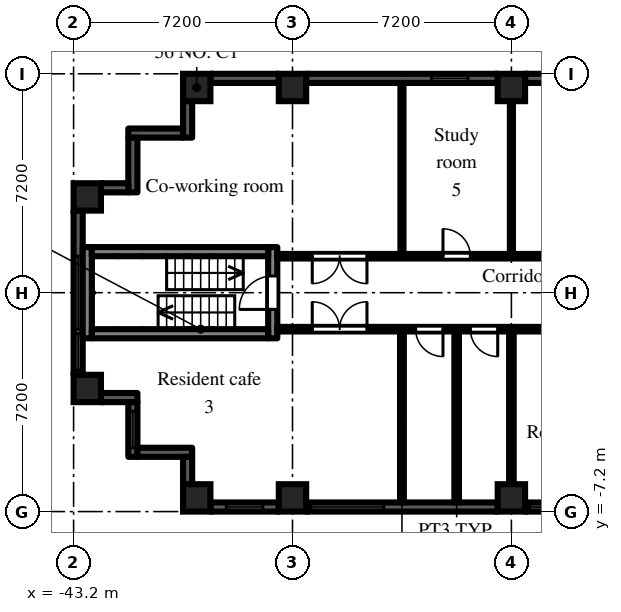
"""IFC4 building model, lengths in metres.
Left out: names, types, materials, properties, quantities, classifications, styles, units other than length and angle.
Written with IfcOpenShell. Run it as: python <this file> out.ifc"""

import sys

from ifc_helpers import new_model, si_unit, direction, frame, frame_2d, origin, origin_2d, place, context, subcontext, project, spatial, rectangle, extrude, element, fill, save


model = new_model("IFC4")
c1 = context("Model", 3, precision=1e-05, world=origin(), true_north=direction((0.0, 1.0)))
c2 = subcontext(c1, "Body", "Model", "MODEL_VIEW")
j1 = project(units=[si_unit("LENGTHUNIT", "METRE"), si_unit("PLANEANGLEUNIT", "RADIAN")], contexts=[c1])
p1 = place(None, origin())
s1 = spatial("IfcSite", under=j1, at=p1, CompositionType="ELEMENT")
p2 = place(p1, origin())
s2 = spatial("IfcBuilding", under=s1, at=p2, CompositionType="ELEMENT")
p3 = place(p2, frame((0.0, 0.0, 35.7)))
s3 = spatial("IfcBuildingStorey", under=s2, at=p3, CompositionType="ELEMENT", Elevation=35.7)
for number, where, z_axis, x_axis in (
    (1, (-42.75, -3.15, 0.0), (0.0, 0.0, 1.0), (1.0, 0.0, 0.0)),
    (2, (-42.75, 3.15, 0.0), (0.0, 0.0, 1.0), (1.0, 0.0, 0.0)),
    (3, (-39.15, -6.75, 0.0), (0.0, 0.0, 1.0), (1.0, 0.0, 0.0)),
    (4, (-39.15, 6.75, 0.0), (0.0, 0.0, 1.0), (1.0, 0.0, 0.0)),
    (5, (-36.0, -6.75, 0.0), (0.0, 0.0, 1.0), (1.0, 0.0, 0.0)),
    (6, (-36.0, 6.75, 0.0), (0.0, 0.0, 1.0), (1.0, 0.0, 0.0)),
    (7, (-28.8, -6.75, 0.0), (0.0, 0.0, 1.0), (1.0, 0.0, 0.0)),
    (8, (-28.8, 6.75, 0.0), (0.0, 0.0, 1.0), (1.0, 0.0, 0.0)),
):
    element("IfcColumn", number, at=place(p3, frame(where, z_axis=z_axis, x_axis=x_axis)), inside=s3, PredefinedType="COLUMN", context=c2, shape_type="SweptSolid", body=[
        extrude(rectangle(XDim=0.9, YDim=0.9, at=origin_2d()), origin(), (0.0, 0.0, 1.0), 3.0),
    ])
p4 = place(p3, frame((-25.2, 7.05, 0.0), z_axis=(0.0, 0.0, 1.0), x_axis=(-1.0, 0.0, 0.0)))
e9 = element("IfcWall", 9, at=p4, inside=s3, PredefinedType="SOLIDWALL", context=c2, shape_type="SweptSolid", body=[
    extrude(rectangle(XDim=3.15, YDim=0.3, at=frame_2d((1.575, 0.0))), origin(), (0.0, 0.0, 1.0), 2.1),
])
p5 = place(p4, frame((0.975, 0.0, 0.2)))
e10 = element("IfcOpeningElement", 10, at=p5, cuts=e9, PredefinedType="OPENING", context=c2, shape_type="SweptSolid", body=[
    extrude(rectangle(XDim=1.2, YDim=1.85, at=frame_2d((0.6, 0.925))), frame((0.0, 0.16, 0.0), z_axis=(0.0, -1.0, 0.0), x_axis=(1.0, 0.0, 0.0)), (0.0, 0.0, 1.0), 0.32),
])
p6 = place(p3, frame((-29.25, 7.05, 0.0), z_axis=(0.0, 0.0, 1.0), x_axis=(-1.0, 0.0, 0.0)))
e11 = element("IfcWall", 11, at=p6, inside=s3, PredefinedType="SOLIDWALL", context=c2, shape_type="SweptSolid", body=[
    extrude(rectangle(XDim=6.3, YDim=0.3, at=frame_2d((3.15, 0.0))), origin(), (0.0, 0.0, 1.0), 2.1),
])
p7 = place(p6, frame((0.975, 0.0, 0.2)))
e12 = element("IfcOpeningElement", 12, at=p7, cuts=e11, PredefinedType="OPENING", context=c2, shape_type="SweptSolid", body=[
    extrude(rectangle(XDim=1.2, YDim=1.85, at=frame_2d((0.6, 0.925))), frame((0.0, 0.16, 0.0), z_axis=(0.0, -1.0, 0.0), x_axis=(1.0, 0.0, 0.0)), (0.0, 0.0, 1.0), 0.32),
])
p8 = place(p3, frame((-36.45, 7.05, 0.0), z_axis=(0.0, 0.0, 1.0), x_axis=(-1.0, 0.0, 0.0)))
e13 = element("IfcWall", 13, at=p8, inside=s3, PredefinedType="SOLIDWALL", context=c2, shape_type="SweptSolid", body=[
    extrude(rectangle(XDim=2.25, YDim=0.3, at=frame_2d((1.125, 0.0))), origin(), (0.0, 0.0, 1.0), 2.1),
])
p9 = place(p3, frame((-39.45, 6.3, 0.0), z_axis=(0.0, 0.0, 1.0), x_axis=(0.0, -1.0, 0.0)))
e14 = element("IfcWall", 14, at=p9, inside=s3, PredefinedType="SOLIDWALL", context=c2, shape_type="SweptSolid", body=[
    extrude(rectangle(XDim=1.2, YDim=0.3, at=frame_2d((0.6, 0.0))), origin(), (0.0, 0.0, 1.0), 2.575),
])
p10 = place(p3, frame((-39.6, 5.25, 0.0), z_axis=(0.0, 0.0, 1.0), x_axis=(-1.0, 0.0, 0.0)))
e15 = element("IfcWall", 15, at=p10, inside=s3, PredefinedType="SOLIDWALL", context=c2, shape_type="SweptSolid", body=[
    extrude(rectangle(XDim=1.8, YDim=0.3, at=frame_2d((0.9, 0.0))), origin(), (0.0, 0.0, 1.0), 2.575),
])
p11 = place(p3, frame((-41.25, 5.1, 0.0), z_axis=(0.0, 0.0, 1.0), x_axis=(0.0, -1.0, 0.0)))
e16 = element("IfcWall", 16, at=p11, inside=s3, PredefinedType="SOLIDWALL", context=c2, shape_type="SweptSolid", body=[
    extrude(rectangle(XDim=1.8, YDim=0.3, at=frame_2d((0.9, 0.0))), origin(), (0.0, 0.0, 1.0), 2.575),
])
p12 = place(p3, frame((-41.4, 3.45, 0.0), z_axis=(0.0, 0.0, 1.0), x_axis=(-1.0, 0.0, 0.0)))
e17 = element("IfcWall", 17, at=p12, inside=s3, PredefinedType="SOLIDWALL", context=c2, shape_type="SweptSolid", body=[
    extrude(rectangle(XDim=0.9, YDim=0.3, at=frame_2d((0.45, 0.0))), origin(), (0.0, 0.0, 1.0), 2.575),
])
p13 = place(p3, frame((-43.05, 2.7, 0.0), z_axis=(0.0, 0.0, 1.0), x_axis=(0.0, -1.0, 0.0)))
e18 = element("IfcWall", 18, at=p13, inside=s3, PredefinedType="SOLIDWALL", context=c2, shape_type="SweptSolid", body=[
    extrude(rectangle(XDim=5.4, YDim=0.3, at=frame_2d((2.7, 0.0))), origin(), (0.0, 0.0, 1.0), 2.1),
])
p14 = place(p13, frame((1.5, 0.0, 0.2)))
e19 = element("IfcOpeningElement", 19, at=p14, cuts=e18, PredefinedType="OPENING", context=c2, shape_type="SweptSolid", body=[
    extrude(rectangle(XDim=2.4, YDim=1.85, at=frame_2d((1.2, 0.925))), frame((0.0, 0.16, 0.0), z_axis=(0.0, -1.0, 0.0), x_axis=(1.0, 0.0, 0.0)), (0.0, 0.0, 1.0), 0.32),
])
p15 = place(p13, frame((4.05, 0.0, 0.2)))
e20 = element("IfcOpeningElement", 20, at=p15, cuts=e18, PredefinedType="OPENING", context=c2, shape_type="SweptSolid", body=[
    extrude(rectangle(XDim=1.2, YDim=1.85, at=frame_2d((0.6, 0.925))), frame((0.0, 0.16, 0.0), z_axis=(0.0, -1.0, 0.0), x_axis=(1.0, 0.0, 0.0)), (0.0, 0.0, 1.0), 0.32),
])
p16 = place(p3, frame((-42.3, -3.45, 0.0), z_axis=(0.0, 0.0, 1.0), x_axis=(1.0, 0.0, 0.0)))
e21 = element("IfcWall", 21, at=p16, inside=s3, PredefinedType="SOLIDWALL", context=c2, shape_type="SweptSolid", body=[
    extrude(rectangle(XDim=1.2, YDim=0.3, at=frame_2d((0.6, 0.0))), origin(), (0.0, 0.0, 1.0), 2.575),
])
p17 = place(p3, frame((-41.25, -3.6, 0.0), z_axis=(0.0, 0.0, 1.0), x_axis=(0.0, -1.0, 0.0)))
e22 = element("IfcWall", 22, at=p17, inside=s3, PredefinedType="SOLIDWALL", context=c2, shape_type="SweptSolid", body=[
    extrude(rectangle(XDim=1.8, YDim=0.3, at=frame_2d((0.9, 0.0))), origin(), (0.0, 0.0, 1.0), 2.575),
])
p18 = place(p17, frame((0.3, 0.0, 0.2)))
e23 = element("IfcOpeningElement", 23, at=p18, cuts=e22, PredefinedType="OPENING", context=c2, shape_type="SweptSolid", body=[
    extrude(rectangle(XDim=1.2, YDim=1.85, at=frame_2d((0.6, 0.925))), frame((0.0, 0.16, 0.0), z_axis=(0.0, -1.0, 0.0), x_axis=(1.0, 0.0, 0.0)), (0.0, 0.0, 1.0), 0.32),
])
p19 = place(p3, frame((-41.1, -5.25, 0.0), z_axis=(0.0, 0.0, 1.0), x_axis=(1.0, 0.0, 0.0)))
e24 = element("IfcWall", 24, at=p19, inside=s3, PredefinedType="SOLIDWALL", context=c2, shape_type="SweptSolid", body=[
    extrude(rectangle(XDim=1.8, YDim=0.3, at=frame_2d((0.9, 0.0))), origin(), (0.0, 0.0, 1.0), 2.575),
])
p20 = place(p3, frame((-39.45, -5.4, 0.0), z_axis=(0.0, 0.0, 1.0), x_axis=(0.0, -1.0, 0.0)))
e25 = element("IfcWall", 25, at=p20, inside=s3, PredefinedType="SOLIDWALL", context=c2, shape_type="SweptSolid", body=[
    extrude(rectangle(XDim=0.9, YDim=0.3, at=frame_2d((0.45, 0.0))), origin(), (0.0, 0.0, 1.0), 2.575),
])
p21 = place(p3, frame((-38.7, -7.05, 0.0), z_axis=(0.0, 0.0, 1.0), x_axis=(1.0, 0.0, 0.0)))
e26 = element("IfcWall", 26, at=p21, inside=s3, PredefinedType="SOLIDWALL", context=c2, shape_type="SweptSolid", body=[
    extrude(rectangle(XDim=2.25, YDim=0.3, at=frame_2d((1.125, 0.0))), origin(), (0.0, 0.0, 1.0), 2.1),
])
p22 = place(p21, frame((0.525, 0.0, 0.2)))
e27 = element("IfcOpeningElement", 27, at=p22, cuts=e26, PredefinedType="OPENING", context=c2, shape_type="SweptSolid", body=[
    extrude(rectangle(XDim=1.2, YDim=1.85, at=frame_2d((0.6, 0.925))), frame((0.0, 0.16, 0.0), z_axis=(0.0, -1.0, 0.0), x_axis=(1.0, 0.0, 0.0)), (0.0, 0.0, 1.0), 0.32),
])
p23 = place(p3, frame((-35.55, -7.05, 0.0), z_axis=(0.0, 0.0, 1.0), x_axis=(1.0, 0.0, 0.0)))
e28 = element("IfcWall", 28, at=p23, inside=s3, PredefinedType="SOLIDWALL", context=c2, shape_type="SweptSolid", body=[
    extrude(rectangle(XDim=6.3, YDim=0.3, at=frame_2d((3.15, 0.0))), origin(), (0.0, 0.0, 1.0), 2.1),
])
p24 = place(p23, frame((0.15, 0.0, 0.2)))
e29 = element("IfcOpeningElement", 29, at=p24, cuts=e28, PredefinedType="OPENING", context=c2, shape_type="SweptSolid", body=[
    extrude(rectangle(XDim=2.4, YDim=1.85, at=frame_2d((1.2, 0.925))), frame((0.0, 0.16, 0.0), z_axis=(0.0, -1.0, 0.0), x_axis=(1.0, 0.0, 0.0)), (0.0, 0.0, 1.0), 0.32),
])
p25 = place(p3, frame((-28.35, -7.05, 0.0), z_axis=(0.0, 0.0, 1.0), x_axis=(1.0, 0.0, 0.0)))
e30 = element("IfcWall", 30, at=p25, inside=s3, PredefinedType="SOLIDWALL", context=c2, shape_type="SweptSolid", body=[
    extrude(rectangle(XDim=3.15, YDim=0.3, at=frame_2d((1.575, 0.0))), origin(), (0.0, 0.0, 1.0), 2.1),
])
p26 = place(p25, frame((0.15, 0.0, 0.2)))
e31 = element("IfcOpeningElement", 31, at=p26, cuts=e30, PredefinedType="OPENING", context=c2, shape_type="SweptSolid", body=[
    extrude(rectangle(XDim=2.4, YDim=1.85, at=frame_2d((1.2, 0.925))), frame((0.0, 0.16, 0.0), z_axis=(0.0, -1.0, 0.0), x_axis=(1.0, 0.0, 0.0)), (0.0, 0.0, 1.0), 0.32),
])
p27 = place(p3, frame((-36.65, -1.5, 0.0), z_axis=(0.0, 0.0, 1.0), x_axis=(0.0, 1.0, 0.0)))
e32 = element("IfcWall", 32, at=p27, inside=s3, PredefinedType="SHEAR", context=c2, shape_type="SweptSolid", body=[
    extrude(rectangle(XDim=3.0, YDim=0.3, at=frame_2d((1.5, 0.0))), origin(), (0.0, 0.0, 1.0), 2.575),
])
p28 = place(p27, frame((0.95, 0.0, 0.0)))
e33 = element("IfcOpeningElement", 33, at=p28, cuts=e32, PredefinedType="OPENING", context=c2, shape_type="SweptSolid", body=[
    extrude(rectangle(XDim=1.1, YDim=2.1, at=frame_2d((0.55, 1.05))), frame((0.0, 0.16, 0.0), z_axis=(0.0, -1.0, 0.0), x_axis=(1.0, 0.0, 0.0)), (0.0, 0.0, 1.0), 0.32),
])
p29 = place(p3, frame((-42.75, -1.5, 0.0), z_axis=(0.0, 0.0, 1.0), x_axis=(0.0, 1.0, 0.0)))
e34 = element("IfcWall", 34, at=p29, inside=s3, PredefinedType="SHEAR", context=c2, shape_type="SweptSolid", body=[
    extrude(rectangle(XDim=3.0, YDim=0.3, at=frame_2d((1.5, 0.0))), origin(), (0.0, 0.0, 1.0), 2.575),
])
for number, where, z_axis, x_axis in (
    (35, (-36.8, -1.35, 0.0), (0.0, 0.0, 1.0), (-1.0, 0.0, 0.0)),
    (36, (-36.8, 1.35, 0.0), (0.0, 0.0, 1.0), (-1.0, 0.0, 0.0)),
):
    element("IfcWall", number, at=place(p3, frame(where, z_axis=z_axis, x_axis=x_axis)), inside=s3, PredefinedType="SHEAR", context=c2, shape_type="SweptSolid", body=[
        extrude(rectangle(XDim=5.8, YDim=0.3, at=frame_2d((2.9, 0.0))), origin(), (0.0, 0.0, 1.0), 2.575),
    ])
p30 = place(p3, frame((-36.5, -1.2, 0.0), z_axis=(0.0, 0.0, 1.0), x_axis=(1.0, 0.0, 0.0)))
e37 = element("IfcWall", 37, at=p30, inside=s3, PredefinedType="PARTITIONING", context=c2, shape_type="SweptSolid", body=[
    extrude(rectangle(XDim=14.9, YDim=0.15, at=frame_2d((7.45, 0.0))), origin(), (0.0, 0.0, 1.0), 2.575),
])
p31 = place(p30, frame((10.4, 0.0, 0.0)))
e38 = element("IfcOpeningElement", 38, at=p31, cuts=e37, PredefinedType="OPENING", context=c2, shape_type="SweptSolid", body=[
    extrude(rectangle(XDim=1.8, YDim=2.1, at=frame_2d((0.9, 1.05))), frame((0.0, 0.085, 0.0), z_axis=(0.0, -1.0, 0.0), x_axis=(1.0, 0.0, 0.0)), (0.0, 0.0, 1.0), 0.17),
])
p32 = place(p30, frame((6.35, 0.0, 0.0)))
e39 = element("IfcOpeningElement", 39, at=p32, cuts=e37, PredefinedType="OPENING", context=c2, shape_type="SweptSolid", body=[
    extrude(rectangle(XDim=0.9, YDim=2.1, at=frame_2d((0.45, 1.05))), frame((0.0, 0.085, 0.0), z_axis=(0.0, -1.0, 0.0), x_axis=(1.0, 0.0, 0.0)), (0.0, 0.0, 1.0), 0.17),
])
p33 = place(p30, frame((4.55, 0.0, 0.0)))
e40 = element("IfcOpeningElement", 40, at=p33, cuts=e37, PredefinedType="OPENING", context=c2, shape_type="SweptSolid", body=[
    extrude(rectangle(XDim=0.9, YDim=2.1, at=frame_2d((0.45, 1.05))), frame((0.0, 0.085, 0.0), z_axis=(0.0, -1.0, 0.0), x_axis=(1.0, 0.0, 0.0)), (0.0, 0.0, 1.0), 0.17),
])
p34 = place(p30, frame((1.15, 0.0, 0.0)))
e41 = element("IfcOpeningElement", 41, at=p34, cuts=e37, PredefinedType="OPENING", context=c2, shape_type="SweptSolid", body=[
    extrude(rectangle(XDim=1.8, YDim=2.1, at=frame_2d((0.9, 1.05))), frame((0.0, 0.085, 0.0), z_axis=(0.0, -1.0, 0.0), x_axis=(1.0, 0.0, 0.0)), (0.0, 0.0, 1.0), 0.17),
])
p35 = place(p3, frame((-36.5, 1.2, 0.0), z_axis=(0.0, 0.0, 1.0), x_axis=(1.0, 0.0, 0.0)))
e42 = element("IfcWall", 42, at=p35, inside=s3, PredefinedType="PARTITIONING", context=c2, shape_type="SweptSolid", body=[
    extrude(rectangle(XDim=14.9, YDim=0.15, at=frame_2d((7.45, 0.0))), origin(), (0.0, 0.0, 1.0), 2.575),
])
p36 = place(p35, frame((10.1, 0.0, 0.0)))
e43 = element("IfcOpeningElement", 43, at=p36, cuts=e42, PredefinedType="OPENING", context=c2, shape_type="SweptSolid", body=[
    extrude(rectangle(XDim=1.0, YDim=2.1, at=frame_2d((0.5, 1.05))), frame((0.0, 0.085, 0.0), z_axis=(0.0, -1.0, 0.0), x_axis=(1.0, 0.0, 0.0)), (0.0, 0.0, 1.0), 0.17),
])
p37 = place(p35, frame((5.45, 0.0, 0.0)))
e44 = element("IfcOpeningElement", 44, at=p37, cuts=e42, PredefinedType="OPENING", context=c2, shape_type="SweptSolid", body=[
    extrude(rectangle(XDim=0.9, YDim=2.1, at=frame_2d((0.45, 1.05))), frame((0.0, 0.085, 0.0), z_axis=(0.0, -1.0, 0.0), x_axis=(1.0, 0.0, 0.0)), (0.0, 0.0, 1.0), 0.17),
])
p38 = place(p35, frame((1.15, 0.0, 0.0)))
e45 = element("IfcOpeningElement", 45, at=p38, cuts=e42, PredefinedType="OPENING", context=c2, shape_type="SweptSolid", body=[
    extrude(rectangle(XDim=1.8, YDim=2.1, at=frame_2d((0.9, 1.05))), frame((0.0, 0.085, 0.0), z_axis=(0.0, -1.0, 0.0), x_axis=(1.0, 0.0, 0.0)), (0.0, 0.0, 1.0), 0.17),
])
p39 = place(p3, frame((-32.4, -6.9, 0.0), z_axis=(0.0, 0.0, 1.0), x_axis=(0.0, 1.0, 0.0)))
e46 = element("IfcWall", 46, at=p39, inside=s3, PredefinedType="PARTITIONING", context=c2, shape_type="SweptSolid", body=[
    extrude(rectangle(XDim=5.625, YDim=0.125, at=frame_2d((2.812, 0.0))), origin(), (0.0, 0.0, 1.0), 2.575),
])
p40 = place(p3, frame((-32.4, 1.275, 0.0), z_axis=(0.0, 0.0, 1.0), x_axis=(0.0, 1.0, 0.0)))
e47 = element("IfcWall", 47, at=p40, inside=s3, PredefinedType="PARTITIONING", context=c2, shape_type="SweptSolid", body=[
    extrude(rectangle(XDim=5.625, YDim=0.1, at=frame_2d((2.812, 0.0))), origin(), (0.0, 0.0, 1.0), 2.575),
])
for number, where, z_axis, x_axis in (
    (48, (-30.6, -6.9, 0.0), (0.0, 0.0, 1.0), (0.0, 1.0, 0.0)),
    (49, (-28.8, -6.9, 0.0), (0.0, 0.0, 1.0), (0.0, 1.0, 0.0)),
):
    element("IfcWall", number, at=place(p3, frame(where, z_axis=z_axis, x_axis=x_axis)), inside=s3, PredefinedType="PARTITIONING", context=c2, shape_type="SweptSolid", body=[
        extrude(rectangle(XDim=5.625, YDim=0.15, at=frame_2d((2.812, 0.0))), origin(), (0.0, 0.0, 1.0), 2.575),
    ])
p41 = place(p3, frame((-28.8, 1.275, 0.0), z_axis=(0.0, 0.0, 1.0), x_axis=(0.0, 1.0, 0.0)))
e50 = element("IfcWall", 50, at=p41, inside=s3, PredefinedType="PARTITIONING", context=c2, shape_type="SweptSolid", body=[
    extrude(rectangle(XDim=5.625, YDim=0.1, at=frame_2d((2.812, 0.0))), origin(), (0.0, 0.0, 1.0), 2.575),
])
p42 = place(p7, origin())
e51 = element("IfcWindow", 51, at=p42, inside=s3, PartitioningType="SINGLE_PANEL", PredefinedType="WINDOW", context=c2, shape_type="SweptSolid", body=[
    extrude(rectangle(XDim=1.2, YDim=1.85, at=frame_2d((0.6, 0.925))), frame((0.0, 0.03, 0.0), z_axis=(0.0, -1.0, 0.0), x_axis=(1.0, 0.0, 0.0)), (0.0, 0.0, 1.0), 0.06),
])
fill(e12, e51)
p43 = place(p14, origin())
e52 = element("IfcWindow", 52, at=p43, inside=s3, PartitioningType="SINGLE_PANEL", PredefinedType="WINDOW", context=c2, shape_type="SweptSolid", body=[
    extrude(rectangle(XDim=2.4, YDim=1.85, at=frame_2d((1.2, 0.925))), frame((0.0, 0.03, 0.0), z_axis=(0.0, -1.0, 0.0), x_axis=(1.0, 0.0, 0.0)), (0.0, 0.0, 1.0), 0.06),
])
fill(e19, e52)
p44 = place(p15, origin())
e53 = element("IfcWindow", 53, at=p44, inside=s3, PartitioningType="SINGLE_PANEL", PredefinedType="WINDOW", context=c2, shape_type="SweptSolid", body=[
    extrude(rectangle(XDim=1.2, YDim=1.85, at=frame_2d((0.6, 0.925))), frame((0.0, 0.03, 0.0), z_axis=(0.0, -1.0, 0.0), x_axis=(1.0, 0.0, 0.0)), (0.0, 0.0, 1.0), 0.06),
])
fill(e20, e53)
p45 = place(p18, origin())
e54 = element("IfcWindow", 54, at=p45, inside=s3, PartitioningType="SINGLE_PANEL", PredefinedType="WINDOW", context=c2, shape_type="SweptSolid", body=[
    extrude(rectangle(XDim=1.2, YDim=1.85, at=frame_2d((0.6, 0.925))), frame((0.0, 0.03, 0.0), z_axis=(0.0, -1.0, 0.0), x_axis=(1.0, 0.0, 0.0)), (0.0, 0.0, 1.0), 0.06),
])
fill(e23, e54)
p46 = place(p22, origin())
e55 = element("IfcWindow", 55, at=p46, inside=s3, PartitioningType="SINGLE_PANEL", PredefinedType="WINDOW", context=c2, shape_type="SweptSolid", body=[
    extrude(rectangle(XDim=1.2, YDim=1.85, at=frame_2d((0.6, 0.925))), frame((0.0, 0.03, 0.0), z_axis=(0.0, -1.0, 0.0), x_axis=(1.0, 0.0, 0.0)), (0.0, 0.0, 1.0), 0.06),
])
fill(e27, e55)
p47 = place(p24, origin())
e56 = element("IfcWindow", 56, at=p47, inside=s3, PartitioningType="SINGLE_PANEL", PredefinedType="WINDOW", context=c2, shape_type="SweptSolid", body=[
    extrude(rectangle(XDim=2.4, YDim=1.85, at=frame_2d((1.2, 0.925))), frame((0.0, 0.03, 0.0), z_axis=(0.0, -1.0, 0.0), x_axis=(1.0, 0.0, 0.0)), (0.0, 0.0, 1.0), 0.06),
])
fill(e29, e56)
p48 = place(p26, origin())
e57 = element("IfcWindow", 57, at=p48, inside=s3, PartitioningType="SINGLE_PANEL", PredefinedType="WINDOW", context=c2, shape_type="SweptSolid", body=[
    extrude(rectangle(XDim=2.4, YDim=1.85, at=frame_2d((1.2, 0.925))), frame((0.0, 0.03, 0.0), z_axis=(0.0, -1.0, 0.0), x_axis=(1.0, 0.0, 0.0)), (0.0, 0.0, 1.0), 0.06),
])
fill(e31, e57)
p49 = place(p28, origin())
e58 = element("IfcDoor", 58, at=p49, inside=s3, OperationType="SINGLE_SWING_LEFT", PredefinedType="DOOR", context=c2, shape_type="SweptSolid", body=[
    extrude(rectangle(XDim=1.1, YDim=2.1, at=frame_2d((0.55, 1.05))), frame((0.0, 0.025, 0.0), z_axis=(0.0, -1.0, 0.0), x_axis=(1.0, 0.0, 0.0)), (0.0, 0.0, 1.0), 0.05),
])
fill(e33, e58)
p50 = place(p32, frame((0.9, 0.0, 0.0), z_axis=(0.0, 0.0, 1.0), x_axis=(-1.0, 0.0, 0.0)))
e59 = element("IfcDoor", 59, at=p50, inside=s3, OperationType="SINGLE_SWING_LEFT", PredefinedType="DOOR", context=c2, shape_type="SweptSolid", body=[
    extrude(rectangle(XDim=0.9, YDim=2.1, at=frame_2d((0.45, 1.05))), frame((0.0, 0.025, 0.0), z_axis=(0.0, -1.0, 0.0), x_axis=(1.0, 0.0, 0.0)), (0.0, 0.0, 1.0), 0.05),
])
fill(e39, e59)
p51 = place(p33, frame((0.9, 0.0, 0.0), z_axis=(0.0, 0.0, 1.0), x_axis=(-1.0, 0.0, 0.0)))
e60 = element("IfcDoor", 60, at=p51, inside=s3, OperationType="SINGLE_SWING_LEFT", PredefinedType="DOOR", context=c2, shape_type="SweptSolid", body=[
    extrude(rectangle(XDim=0.9, YDim=2.1, at=frame_2d((0.45, 1.05))), frame((0.0, 0.025, 0.0), z_axis=(0.0, -1.0, 0.0), x_axis=(1.0, 0.0, 0.0)), (0.0, 0.0, 1.0), 0.05),
])
fill(e40, e60)
p52 = place(p34, origin())
e61 = element("IfcDoor", 61, at=p52, inside=s3, OperationType="DOUBLE_DOOR_DOUBLE_SWING", PredefinedType="DOOR", context=c2, shape_type="SweptSolid", body=[
    extrude(rectangle(XDim=1.8, YDim=2.1, at=frame_2d((0.9, 1.05))), frame((0.0, 0.025, 0.0), z_axis=(0.0, -1.0, 0.0), x_axis=(1.0, 0.0, 0.0)), (0.0, 0.0, 1.0), 0.05),
])
fill(e41, e61)
p53 = place(p37, origin())
e62 = element("IfcDoor", 62, at=p53, inside=s3, OperationType="SINGLE_SWING_LEFT", PredefinedType="DOOR", context=c2, shape_type="SweptSolid", body=[
    extrude(rectangle(XDim=0.9, YDim=2.1, at=frame_2d((0.45, 1.05))), frame((0.0, 0.025, 0.0), z_axis=(0.0, -1.0, 0.0), x_axis=(1.0, 0.0, 0.0)), (0.0, 0.0, 1.0), 0.05),
])
fill(e44, e62)
p54 = place(p38, frame((1.8, 0.0, 0.0), z_axis=(0.0, 0.0, 1.0), x_axis=(-1.0, 0.0, 0.0)))
e63 = element("IfcDoor", 63, at=p54, inside=s3, OperationType="DOUBLE_DOOR_DOUBLE_SWING", PredefinedType="DOOR", context=c2, shape_type="SweptSolid", body=[
    extrude(rectangle(XDim=1.8, YDim=2.1, at=frame_2d((0.9, 1.05))), frame((0.0, 0.025, 0.0), z_axis=(0.0, -1.0, 0.0), x_axis=(1.0, 0.0, 0.0)), (0.0, 0.0, 1.0), 0.05),
])
fill(e45, e63)
save(model, sys.argv[1])
